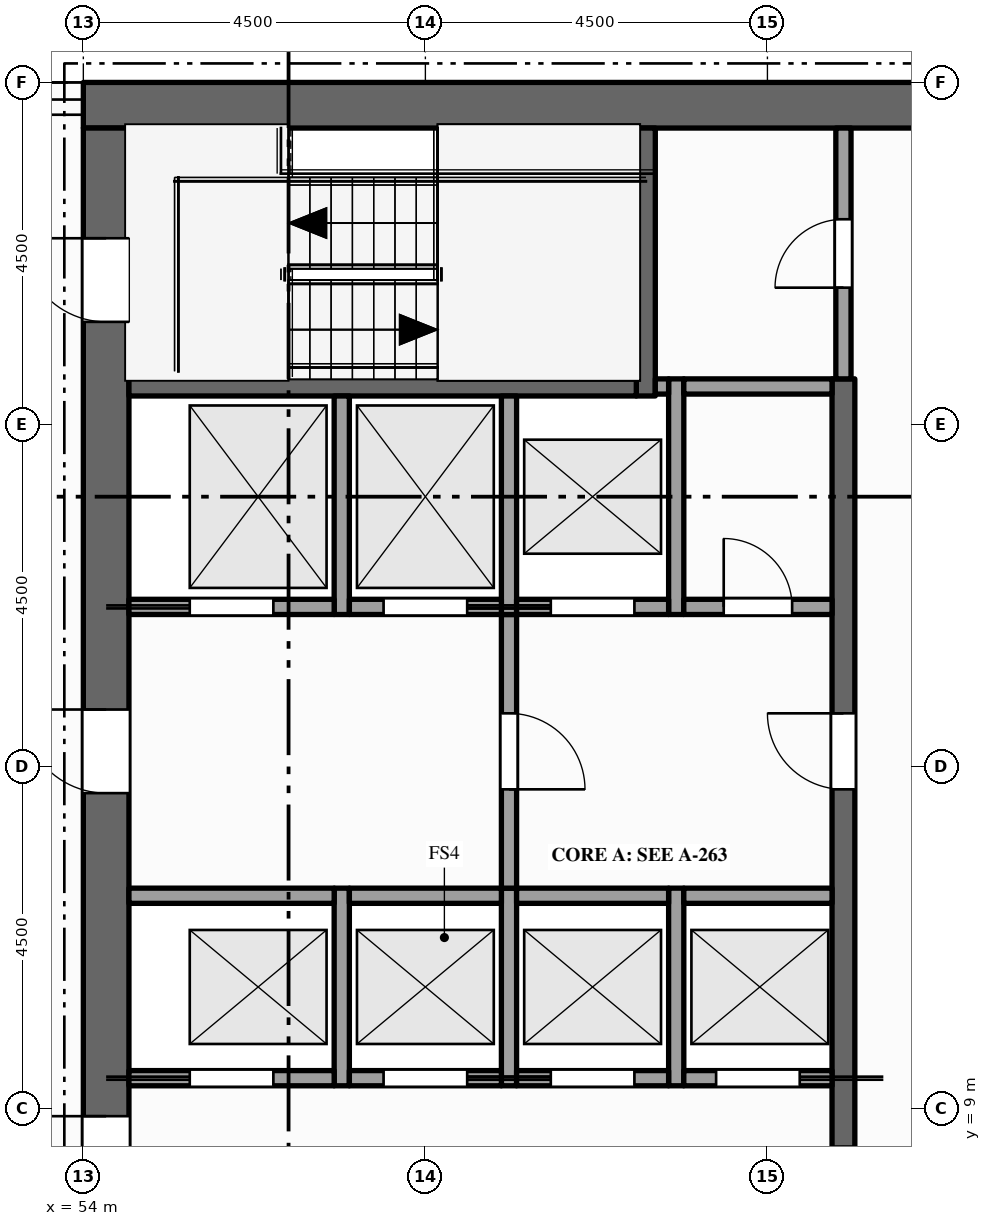
"""IFC4 building model, lengths in metres.
Left out: names, types, materials, properties, quantities, classifications, styles, units other than length and angle.
Written with IfcOpenShell. Run it as: python <this file> out.ifc"""

import sys

from ifc_helpers import new_model, si_unit, direction, frame, frame_2d, origin, place, context, subcontext, project, spatial, rectangle, extrude, element, fill, save


model = new_model("IFC4")
c1 = context("Model", 3, precision=1e-05, world=origin(), true_north=direction((0.0, 1.0)))
c2 = subcontext(c1, "Body", "Model", "MODEL_VIEW")
j1 = project(units=[si_unit("LENGTHUNIT", "METRE"), si_unit("PLANEANGLEUNIT", "RADIAN")], contexts=[c1])
p1 = place(None, origin())
s1 = spatial("IfcSite", under=j1, at=p1, CompositionType="ELEMENT")
p2 = place(p1, origin())
s2 = spatial("IfcBuilding", under=s1, at=p2, CompositionType="ELEMENT")
p3 = place(p2, frame((0.0, 0.0, 345.5)))
s3 = spatial("IfcBuildingStorey", under=s2, at=p3, CompositionType="ELEMENT", Elevation=345.5)
p4 = place(p3, frame((54.0, 22.2, -0.15), z_axis=(0.0, 0.0, 1.0), x_axis=(1.0, 0.0, 0.0)))
e1 = element("IfcWall", 1, at=p4, inside=s3, PredefinedType="SHEAR", context=c2, shape_type="SweptSolid", body=[
    extrude(rectangle(XDim=13.5, YDim=0.6, at=frame_2d((6.75, 0.0))), origin(), (0.0, 0.0, 1.0), 5.0),
])
p5 = place(p3, frame((54.3, 0.6, -0.15), z_axis=(0.0, 0.0, 1.0), x_axis=(0.0, 1.0, 0.0)))
e2 = element("IfcWall", 2, at=p5, inside=s3, PredefinedType="SHEAR", context=c2, shape_type="SweptSolid", body=[
    extrude(rectangle(XDim=21.3, YDim=0.6, at=frame_2d((10.65, 0.0))), origin(), (0.0, 0.0, 1.0), 5.0),
])
p6 = place(p5, frame((6.5, 0.0, 0.15)))
e3 = element("IfcOpeningElement", 3, at=p6, cuts=e2, PredefinedType="OPENING", context=c2, shape_type="SweptSolid", body=[
    extrude(rectangle(XDim=1.8, YDim=2.1, at=frame_2d((0.9, 1.05))), frame((0.0, 0.31, 0.0), z_axis=(0.0, -1.0, 0.0), x_axis=(1.0, 0.0, 0.0)), (0.0, 0.0, 1.0), 0.62),
])
p7 = place(p5, frame((12.55, 0.0, 0.15)))
e4 = element("IfcOpeningElement", 4, at=p7, cuts=e2, PredefinedType="OPENING", context=c2, shape_type="SweptSolid", body=[
    extrude(rectangle(XDim=1.1, YDim=2.1, at=frame_2d((0.55, 1.05))), frame((0.0, 0.31, 0.0), z_axis=(0.0, -1.0, 0.0), x_axis=(1.0, 0.0, 0.0)), (0.0, 0.0, 1.0), 0.62),
])
p8 = place(p5, frame((1.55, 0.0, 0.15)))
e5 = element("IfcOpeningElement", 5, at=p8, cuts=e2, PredefinedType="OPENING", context=c2, shape_type="SweptSolid", body=[
    extrude(rectangle(XDim=1.1, YDim=2.1, at=frame_2d((0.55, 1.05))), frame((0.0, 0.31, 0.0), z_axis=(0.0, -1.0, 0.0), x_axis=(1.0, 0.0, 0.0)), (0.0, 0.0, 1.0), 0.62),
])
p9 = place(p5, frame((18.75, 0.0, 0.15)))
e6 = element("IfcOpeningElement", 6, at=p9, cuts=e2, PredefinedType="OPENING", context=c2, shape_type="SweptSolid", body=[
    extrude(rectangle(XDim=1.1, YDim=2.1, at=frame_2d((0.55, 1.05))), frame((0.0, 0.31, 0.0), z_axis=(0.0, -1.0, 0.0), x_axis=(1.0, 0.0, 0.0)), (0.0, 0.0, 1.0), 0.62),
])
p10 = place(p3, frame((57.4, 9.3, 0.0), z_axis=(0.0, 0.0, 1.0), x_axis=(0.0, 1.0, 0.0)))
e7 = element("IfcWall", 7, at=p10, inside=s3, PredefinedType="SOLIDWALL", context=c2, shape_type="SweptSolid", body=[
    extrude(rectangle(XDim=2.6, YDim=0.2, at=frame_2d((1.3, 0.0))), origin(), (0.0, 0.0, 1.0), 4.8),
])
p11 = place(p3, frame((57.4, 15.5, 0.0), z_axis=(0.0, 0.0, 1.0), x_axis=(0.0, 1.0, 0.0)))
e8 = element("IfcWall", 8, at=p11, inside=s3, PredefinedType="SOLIDWALL", context=c2, shape_type="SweptSolid", body=[
    extrude(rectangle(XDim=2.875, YDim=0.2, at=frame_2d((1.438, 0.0))), origin(), (0.0, 0.0, 1.0), 4.8),
])
p12 = place(p3, frame((59.6, 9.3, 0.0), z_axis=(0.0, 0.0, 1.0), x_axis=(0.0, 1.0, 0.0)))
e9 = element("IfcWall", 9, at=p12, inside=s3, PredefinedType="SOLIDWALL", context=c2, shape_type="SweptSolid", body=[
    extrude(rectangle(XDim=2.6, YDim=0.2, at=frame_2d((1.3, 0.0))), origin(), (0.0, 0.0, 1.0), 4.8),
])
p13 = place(p3, frame((59.6, 11.9, 0.0), z_axis=(0.0, 0.0, 1.0), x_axis=(0.0, 1.0, 0.0)))
e10 = element("IfcWall", 10, at=p13, inside=s3, PredefinedType="PARTITIONING", context=c2, shape_type="SweptSolid", body=[
    extrude(rectangle(XDim=3.6, YDim=0.2, at=frame_2d((1.8, 0.0))), origin(), (0.0, 0.0, 1.0), 4.8),
])
p14 = place(p13, frame((1.3, 0.0, 0.0)))
e11 = element("IfcOpeningElement", 11, at=p14, cuts=e10, PredefinedType="OPENING", context=c2, shape_type="SweptSolid", body=[
    extrude(rectangle(XDim=1.0, YDim=2.1, at=frame_2d((0.5, 1.05))), frame((0.0, 0.11, 0.0), z_axis=(0.0, -1.0, 0.0), x_axis=(1.0, 0.0, 0.0)), (0.0, 0.0, 1.0), 0.22),
])
p15 = place(p3, frame((59.6, 15.5, 0.0), z_axis=(0.0, 0.0, 1.0), x_axis=(0.0, 1.0, 0.0)))
e12 = element("IfcWall", 12, at=p15, inside=s3, PredefinedType="SOLIDWALL", context=c2, shape_type="SweptSolid", body=[
    extrude(rectangle(XDim=2.875, YDim=0.2, at=frame_2d((1.438, 0.0))), origin(), (0.0, 0.0, 1.0), 4.8),
])
p16 = place(p3, frame((61.4, 18.375, 0.0), z_axis=(0.0, 0.0, 1.0), x_axis=(0.0, 1.0, 0.0)))
e13 = element("IfcWall", 13, at=p16, inside=s3, PredefinedType="SHEAR", context=c2, shape_type="SweptSolid", body=[
    extrude(rectangle(XDim=3.525, YDim=0.25, at=frame_2d((1.762, 0.0))), origin(), (0.0, 0.0, 1.0), 4.8),
])
p17 = place(p3, frame((61.8, 9.3, 0.0), z_axis=(0.0, 0.0, 1.0), x_axis=(0.0, 1.0, 0.0)))
e14 = element("IfcWall", 14, at=p17, inside=s3, PredefinedType="SOLIDWALL", context=c2, shape_type="SweptSolid", body=[
    extrude(rectangle(XDim=2.6, YDim=0.2, at=frame_2d((1.3, 0.0))), origin(), (0.0, 0.0, 1.0), 4.8),
])
p18 = place(p3, frame((61.8, 15.5, 0.0), z_axis=(0.0, 0.0, 1.0), x_axis=(0.0, 1.0, 0.0)))
e15 = element("IfcWall", 15, at=p18, inside=s3, PredefinedType="SOLIDWALL", context=c2, shape_type="SweptSolid", body=[
    extrude(rectangle(XDim=3.1, YDim=0.2, at=frame_2d((1.55, 0.0))), origin(), (0.0, 0.0, 1.0), 4.8),
])
p19 = place(p3, frame((64.0, 4.1, 0.0), z_axis=(0.0, 0.0, 1.0), x_axis=(0.0, 1.0, 0.0)))
e16 = element("IfcWall", 16, at=p19, inside=s3, PredefinedType="SHEAR", context=c2, shape_type="SweptSolid", body=[
    extrude(rectangle(XDim=14.5, YDim=0.3, at=frame_2d((7.25, 0.0))), origin(), (0.0, 0.0, 1.0), 4.8),
])
p20 = place(p19, frame((3.4, 0.0, 0.0)))
e17 = element("IfcOpeningElement", 17, at=p20, cuts=e16, PredefinedType="OPENING", context=c2, shape_type="SweptSolid", body=[
    extrude(rectangle(XDim=1.0, YDim=2.1, at=frame_2d((0.5, 1.05))), frame((0.0, 0.16, 0.0), z_axis=(0.0, -1.0, 0.0), x_axis=(1.0, 0.0, 0.0)), (0.0, 0.0, 1.0), 0.32),
])
p21 = place(p19, frame((9.1, 0.0, 0.0)))
e18 = element("IfcOpeningElement", 18, at=p21, cuts=e16, PredefinedType="OPENING", context=c2, shape_type="SweptSolid", body=[
    extrude(rectangle(XDim=1.0, YDim=2.1, at=frame_2d((0.5, 1.05))), frame((0.0, 0.16, 0.0), z_axis=(0.0, -1.0, 0.0), x_axis=(1.0, 0.0, 0.0)), (0.0, 0.0, 1.0), 0.32),
])
p22 = place(p3, frame((64.0, 18.6, 0.0), z_axis=(0.0, 0.0, 1.0), x_axis=(0.0, 1.0, 0.0)))
e19 = element("IfcWall", 19, at=p22, inside=s3, PredefinedType="PARTITIONING", context=c2, shape_type="SweptSolid", body=[
    extrude(rectangle(XDim=3.3, YDim=0.2, at=frame_2d((1.65, 0.0))), origin(), (0.0, 0.0, 1.0), 4.8),
])
p23 = place(p22, frame((1.2, 0.0, 0.0)))
e20 = element("IfcOpeningElement", 20, at=p23, cuts=e19, PredefinedType="OPENING", context=c2, shape_type="SweptSolid", body=[
    extrude(rectangle(XDim=0.9, YDim=2.1, at=frame_2d((0.45, 1.05))), frame((0.0, 0.11, 0.0), z_axis=(0.0, -1.0, 0.0), x_axis=(1.0, 0.0, 0.0)), (0.0, 0.0, 1.0), 0.22),
])
p24 = place(p3, frame((54.6, 9.4, 0.0), z_axis=(0.0, 0.0, 1.0), x_axis=(1.0, 0.0, 0.0)))
e21 = element("IfcWall", 21, at=p24, inside=s3, PredefinedType="SOLIDWALL", context=c2, shape_type="SweptSolid", body=[
    extrude(rectangle(XDim=2.7, YDim=0.2, at=frame_2d((1.35, 0.0))), origin(), (0.0, 0.0, 1.0), 4.8),
])
p25 = place(p24, frame((0.8, 0.0, 0.012)))
e22 = element("IfcOpeningElement", 22, at=p25, cuts=e21, PredefinedType="OPENING", context=c2, shape_type="SweptSolid", body=[
    extrude(rectangle(XDim=1.1, YDim=2.1, at=frame_2d((0.55, 1.05))), frame((0.0, 0.11, 0.0), z_axis=(0.0, -1.0, 0.0), x_axis=(1.0, 0.0, 0.0)), (0.0, 0.0, 1.0), 0.22),
])
p26 = place(p3, frame((57.5, 9.4, 0.0), z_axis=(0.0, 0.0, 1.0), x_axis=(1.0, 0.0, 0.0)))
e23 = element("IfcWall", 23, at=p26, inside=s3, PredefinedType="SOLIDWALL", context=c2, shape_type="SweptSolid", body=[
    extrude(rectangle(XDim=2.0, YDim=0.2, at=frame_2d((1.0, 0.0))), origin(), (0.0, 0.0, 1.0), 4.8),
])
p27 = place(p26, frame((0.45, 0.0, 0.012)))
e24 = element("IfcOpeningElement", 24, at=p27, cuts=e23, PredefinedType="OPENING", context=c2, shape_type="SweptSolid", body=[
    extrude(rectangle(XDim=1.1, YDim=2.1, at=frame_2d((0.55, 1.05))), frame((0.0, 0.11, 0.0), z_axis=(0.0, -1.0, 0.0), x_axis=(1.0, 0.0, 0.0)), (0.0, 0.0, 1.0), 0.22),
])
p28 = place(p3, frame((59.7, 9.4, 0.0), z_axis=(0.0, 0.0, 1.0), x_axis=(1.0, 0.0, 0.0)))
e25 = element("IfcWall", 25, at=p28, inside=s3, PredefinedType="SOLIDWALL", context=c2, shape_type="SweptSolid", body=[
    extrude(rectangle(XDim=2.0, YDim=0.2, at=frame_2d((1.0, 0.0))), origin(), (0.0, 0.0, 1.0), 4.8),
])
p29 = place(p28, frame((0.45, 0.0, 0.012)))
e26 = element("IfcOpeningElement", 26, at=p29, cuts=e25, PredefinedType="OPENING", context=c2, shape_type="SweptSolid", body=[
    extrude(rectangle(XDim=1.1, YDim=2.1, at=frame_2d((0.55, 1.05))), frame((0.0, 0.11, 0.0), z_axis=(0.0, -1.0, 0.0), x_axis=(1.0, 0.0, 0.0)), (0.0, 0.0, 1.0), 0.22),
])
p30 = place(p3, frame((61.9, 9.4, 0.0), z_axis=(0.0, 0.0, 1.0), x_axis=(1.0, 0.0, 0.0)))
e27 = element("IfcWall", 27, at=p30, inside=s3, PredefinedType="SOLIDWALL", context=c2, shape_type="SweptSolid", body=[
    extrude(rectangle(XDim=1.95, YDim=0.2, at=frame_2d((0.975, 0.0))), origin(), (0.0, 0.0, 1.0), 4.8),
])
p31 = place(p30, frame((0.425, 0.0, 0.012)))
e28 = element("IfcOpeningElement", 28, at=p31, cuts=e27, PredefinedType="OPENING", context=c2, shape_type="SweptSolid", body=[
    extrude(rectangle(XDim=1.1, YDim=2.1, at=frame_2d((0.55, 1.05))), frame((0.0, 0.11, 0.0), z_axis=(0.0, -1.0, 0.0), x_axis=(1.0, 0.0, 0.0)), (0.0, 0.0, 1.0), 0.22),
])
p32 = place(p3, frame((54.6, 11.8, 0.0), z_axis=(0.0, 0.0, 1.0), x_axis=(1.0, 0.0, 0.0)))
e29 = element("IfcWall", 29, at=p32, inside=s3, PredefinedType="SOLIDWALL", context=c2, shape_type="SweptSolid", body=[
    extrude(rectangle(XDim=2.7, YDim=0.2, at=frame_2d((1.35, 0.0))), origin(), (0.0, 0.0, 1.0), 4.8),
])
for number, where, z_axis, x_axis in (
    (30, (57.5, 11.8, 0.0), (0.0, 0.0, 1.0), (1.0, 0.0, 0.0)),
    (31, (59.7, 11.8, 0.0), (0.0, 0.0, 1.0), (1.0, 0.0, 0.0)),
):
    element("IfcWall", number, at=place(p3, frame(where, z_axis=z_axis, x_axis=x_axis)), inside=s3, PredefinedType="SOLIDWALL", context=c2, shape_type="SweptSolid", body=[
        extrude(rectangle(XDim=2.0, YDim=0.2, at=frame_2d((1.0, 0.0))), origin(), (0.0, 0.0, 1.0), 4.8),
    ])
p33 = place(p3, frame((61.9, 11.8, 0.0), z_axis=(0.0, 0.0, 1.0), x_axis=(1.0, 0.0, 0.0)))
e32 = element("IfcWall", 32, at=p33, inside=s3, PredefinedType="SOLIDWALL", context=c2, shape_type="SweptSolid", body=[
    extrude(rectangle(XDim=1.95, YDim=0.2, at=frame_2d((0.975, 0.0))), origin(), (0.0, 0.0, 1.0), 4.8),
])
p34 = place(p3, frame((54.6, 15.6, 0.0), z_axis=(0.0, 0.0, 1.0), x_axis=(1.0, 0.0, 0.0)))
e33 = element("IfcWall", 33, at=p34, inside=s3, PredefinedType="SOLIDWALL", context=c2, shape_type="SweptSolid", body=[
    extrude(rectangle(XDim=2.7, YDim=0.2, at=frame_2d((1.35, 0.0))), origin(), (0.0, 0.0, 1.0), 4.8),
])
p35 = place(p34, frame((0.8, 0.0, 0.012)))
e34 = element("IfcOpeningElement", 34, at=p35, cuts=e33, PredefinedType="OPENING", context=c2, shape_type="SweptSolid", body=[
    extrude(rectangle(XDim=1.1, YDim=2.1, at=frame_2d((0.55, 1.05))), frame((0.0, 0.11, 0.0), z_axis=(0.0, -1.0, 0.0), x_axis=(1.0, 0.0, 0.0)), (0.0, 0.0, 1.0), 0.22),
])
p36 = place(p3, frame((57.5, 15.6, 0.0), z_axis=(0.0, 0.0, 1.0), x_axis=(1.0, 0.0, 0.0)))
e35 = element("IfcWall", 35, at=p36, inside=s3, PredefinedType="SOLIDWALL", context=c2, shape_type="SweptSolid", body=[
    extrude(rectangle(XDim=2.0, YDim=0.2, at=frame_2d((1.0, 0.0))), origin(), (0.0, 0.0, 1.0), 4.8),
])
p37 = place(p36, frame((0.45, 0.0, 0.012)))
e36 = element("IfcOpeningElement", 36, at=p37, cuts=e35, PredefinedType="OPENING", context=c2, shape_type="SweptSolid", body=[
    extrude(rectangle(XDim=1.1, YDim=2.1, at=frame_2d((0.55, 1.05))), frame((0.0, 0.11, 0.0), z_axis=(0.0, -1.0, 0.0), x_axis=(1.0, 0.0, 0.0)), (0.0, 0.0, 1.0), 0.22),
])
p38 = place(p3, frame((59.7, 15.6, 0.0), z_axis=(0.0, 0.0, 1.0), x_axis=(1.0, 0.0, 0.0)))
e37 = element("IfcWall", 37, at=p38, inside=s3, PredefinedType="SOLIDWALL", context=c2, shape_type="SweptSolid", body=[
    extrude(rectangle(XDim=2.0, YDim=0.2, at=frame_2d((1.0, 0.0))), origin(), (0.0, 0.0, 1.0), 4.8),
])
p39 = place(p38, frame((0.45, 0.0, 0.012)))
e38 = element("IfcOpeningElement", 38, at=p39, cuts=e37, PredefinedType="OPENING", context=c2, shape_type="SweptSolid", body=[
    extrude(rectangle(XDim=1.1, YDim=2.1, at=frame_2d((0.55, 1.05))), frame((0.0, 0.11, 0.0), z_axis=(0.0, -1.0, 0.0), x_axis=(1.0, 0.0, 0.0)), (0.0, 0.0, 1.0), 0.22),
])
p40 = place(p3, frame((61.9, 15.6, 0.0), z_axis=(0.0, 0.0, 1.0), x_axis=(1.0, 0.0, 0.0)))
e39 = element("IfcWall", 39, at=p40, inside=s3, PredefinedType="PARTITIONING", context=c2, shape_type="SweptSolid", body=[
    extrude(rectangle(XDim=1.95, YDim=0.2, at=frame_2d((0.975, 0.0))), origin(), (0.0, 0.0, 1.0), 4.8),
])
p41 = place(p40, frame((0.525, 0.0, 0.0)))
e40 = element("IfcOpeningElement", 40, at=p41, cuts=e39, PredefinedType="OPENING", context=c2, shape_type="SweptSolid", body=[
    extrude(rectangle(XDim=0.9, YDim=2.1, at=frame_2d((0.45, 1.05))), frame((0.0, 0.11, 0.0), z_axis=(0.0, -1.0, 0.0), x_axis=(1.0, 0.0, 0.0)), (0.0, 0.0, 1.0), 0.22),
])
p42 = place(p3, frame((54.6, 18.5, 0.0), z_axis=(0.0, 0.0, 1.0), x_axis=(1.0, 0.0, 0.0)))
e41 = element("IfcWall", 41, at=p42, inside=s3, PredefinedType="SHEAR", context=c2, shape_type="SweptSolid", body=[
    extrude(rectangle(XDim=6.675, YDim=0.25, at=frame_2d((3.337, 0.0))), origin(), (0.0, 0.0, 1.0), 4.8),
])
p43 = place(p3, frame((61.525, 18.5, 0.0), z_axis=(0.0, 0.0, 1.0), x_axis=(1.0, 0.0, 0.0)))
e42 = element("IfcWall", 42, at=p43, inside=s3, PredefinedType="SOLIDWALL", context=c2, shape_type="SweptSolid", body=[
    extrude(rectangle(XDim=0.175, YDim=0.2, at=frame_2d((0.087, 0.0))), origin(), (0.0, 0.0, 1.0), 4.8),
])
p44 = place(p3, frame((61.9, 18.5, 0.0), z_axis=(0.0, 0.0, 1.0), x_axis=(1.0, 0.0, 0.0)))
e43 = element("IfcWall", 43, at=p44, inside=s3, PredefinedType="PARTITIONING", context=c2, shape_type="SweptSolid", body=[
    extrude(rectangle(XDim=1.95, YDim=0.2, at=frame_2d((0.975, 0.0))), origin(), (0.0, 0.0, 1.0), 4.8),
])
p45 = place(p25, origin())
e44 = element("IfcDoor", 44, at=p45, inside=s3, OperationType="SLIDING_TO_LEFT", PredefinedType="DOOR", context=c2, shape_type="SweptSolid", body=[
    extrude(rectangle(XDim=1.1, YDim=2.1, at=frame_2d((0.55, 1.05))), frame((0.0, 0.025, 0.0), z_axis=(0.0, -1.0, 0.0), x_axis=(1.0, 0.0, 0.0)), (0.0, 0.0, 1.0), 0.05),
])
fill(e22, e44)
p46 = place(p27, origin())
e45 = element("IfcDoor", 45, at=p46, inside=s3, OperationType="SLIDING_TO_RIGHT", PredefinedType="DOOR", context=c2, shape_type="SweptSolid", body=[
    extrude(rectangle(XDim=1.1, YDim=2.1, at=frame_2d((0.55, 1.05))), frame((0.0, 0.025, 0.0), z_axis=(0.0, -1.0, 0.0), x_axis=(1.0, 0.0, 0.0)), (0.0, 0.0, 1.0), 0.05),
])
fill(e24, e45)
p47 = place(p29, origin())
e46 = element("IfcDoor", 46, at=p47, inside=s3, OperationType="SLIDING_TO_LEFT", PredefinedType="DOOR", context=c2, shape_type="SweptSolid", body=[
    extrude(rectangle(XDim=1.1, YDim=2.1, at=frame_2d((0.55, 1.05))), frame((0.0, 0.025, 0.0), z_axis=(0.0, -1.0, 0.0), x_axis=(1.0, 0.0, 0.0)), (0.0, 0.0, 1.0), 0.05),
])
fill(e26, e46)
p48 = place(p31, origin())
e47 = element("IfcDoor", 47, at=p48, inside=s3, OperationType="SLIDING_TO_RIGHT", PredefinedType="DOOR", context=c2, shape_type="SweptSolid", body=[
    extrude(rectangle(XDim=1.1, YDim=2.1, at=frame_2d((0.55, 1.05))), frame((0.0, 0.025, 0.0), z_axis=(0.0, -1.0, 0.0), x_axis=(1.0, 0.0, 0.0)), (0.0, 0.0, 1.0), 0.05),
])
fill(e28, e47)
p49 = place(p35, origin())
e48 = element("IfcDoor", 48, at=p49, inside=s3, OperationType="SLIDING_TO_LEFT", PredefinedType="DOOR", context=c2, shape_type="SweptSolid", body=[
    extrude(rectangle(XDim=1.1, YDim=2.1, at=frame_2d((0.55, 1.05))), frame((0.0, 0.025, 0.0), z_axis=(0.0, -1.0, 0.0), x_axis=(1.0, 0.0, 0.0)), (0.0, 0.0, 1.0), 0.05),
])
fill(e34, e48)
p50 = place(p37, origin())
e49 = element("IfcDoor", 49, at=p50, inside=s3, OperationType="SLIDING_TO_RIGHT", PredefinedType="DOOR", context=c2, shape_type="SweptSolid", body=[
    extrude(rectangle(XDim=1.1, YDim=2.1, at=frame_2d((0.55, 1.05))), frame((0.0, 0.025, 0.0), z_axis=(0.0, -1.0, 0.0), x_axis=(1.0, 0.0, 0.0)), (0.0, 0.0, 1.0), 0.05),
])
fill(e36, e49)
p51 = place(p39, origin())
e50 = element("IfcDoor", 50, at=p51, inside=s3, OperationType="SLIDING_TO_LEFT", PredefinedType="DOOR", context=c2, shape_type="SweptSolid", body=[
    extrude(rectangle(XDim=1.1, YDim=2.1, at=frame_2d((0.55, 1.05))), frame((0.0, 0.025, 0.0), z_axis=(0.0, -1.0, 0.0), x_axis=(1.0, 0.0, 0.0)), (0.0, 0.0, 1.0), 0.05),
])
fill(e38, e50)
p52 = place(p6, origin())
e51 = element("IfcDoor", 51, at=p52, inside=s3, OperationType="DOUBLE_DOOR_SINGLE_SWING", PredefinedType="DOOR", context=c2, shape_type="SweptSolid", body=[
    extrude(rectangle(XDim=1.8, YDim=2.1, at=frame_2d((0.9, 1.05))), frame((0.0, 0.025, 0.0), z_axis=(0.0, -1.0, 0.0), x_axis=(1.0, 0.0, 0.0)), (0.0, 0.0, 1.0), 0.05),
])
fill(e3, e51)
p53 = place(p7, origin())
e52 = element("IfcDoor", 52, at=p53, inside=s3, OperationType="SINGLE_SWING_RIGHT", PredefinedType="DOOR", context=c2, shape_type="SweptSolid", body=[
    extrude(rectangle(XDim=1.1, YDim=2.1, at=frame_2d((0.55, 1.05))), frame((0.0, 0.025, 0.0), z_axis=(0.0, -1.0, 0.0), x_axis=(1.0, 0.0, 0.0)), (0.0, 0.0, 1.0), 0.05),
])
fill(e4, e52)
p54 = place(p14, origin())
e53 = element("IfcDoor", 53, at=p54, inside=s3, OperationType="SINGLE_SWING_LEFT", PredefinedType="DOOR", context=c2, shape_type="SweptSolid", body=[
    extrude(rectangle(XDim=1.0, YDim=2.1, at=frame_2d((0.5, 1.05))), frame((0.0, 0.025, 0.0), z_axis=(0.0, -1.0, 0.0), x_axis=(1.0, 0.0, 0.0)), (0.0, 0.0, 1.0), 0.05),
])
fill(e11, e53)
p55 = place(p21, origin())
e54 = element("IfcDoor", 54, at=p55, inside=s3, OperationType="SINGLE_SWING_RIGHT", PredefinedType="DOOR", context=c2, shape_type="SweptSolid", body=[
    extrude(rectangle(XDim=1.0, YDim=2.1, at=frame_2d((0.5, 1.05))), frame((0.0, 0.025, 0.0), z_axis=(0.0, -1.0, 0.0), x_axis=(1.0, 0.0, 0.0)), (0.0, 0.0, 1.0), 0.05),
])
fill(e18, e54)
p56 = place(p9, origin())
e55 = element("IfcDoor", 55, at=p56, inside=s3, OperationType="SINGLE_SWING_RIGHT", PredefinedType="DOOR", context=c2, shape_type="SweptSolid", body=[
    extrude(rectangle(XDim=1.1, YDim=2.1, at=frame_2d((0.55, 1.05))), frame((0.0, 0.025, 0.0), z_axis=(0.0, -1.0, 0.0), x_axis=(1.0, 0.0, 0.0)), (0.0, 0.0, 1.0), 0.05),
])
fill(e6, e55)
p57 = place(p23, origin())
e56 = element("IfcDoor", 56, at=p57, inside=s3, OperationType="SINGLE_SWING_LEFT", PredefinedType="DOOR", context=c2, shape_type="SweptSolid", body=[
    extrude(rectangle(XDim=0.9, YDim=2.1, at=frame_2d((0.45, 1.05))), frame((0.0, 0.025, 0.0), z_axis=(0.0, -1.0, 0.0), x_axis=(1.0, 0.0, 0.0)), (0.0, 0.0, 1.0), 0.05),
])
fill(e20, e56)
p58 = place(p41, origin())
e57 = element("IfcDoor", 57, at=p58, inside=s3, OperationType="SINGLE_SWING_LEFT", PredefinedType="DOOR", context=c2, shape_type="SweptSolid", body=[
    extrude(rectangle(XDim=0.9, YDim=2.1, at=frame_2d((0.45, 1.05))), frame((0.0, 0.025, 0.0), z_axis=(0.0, -1.0, 0.0), x_axis=(1.0, 0.0, 0.0)), (0.0, 0.0, 1.0), 0.05),
])
fill(e40, e57)
save(model, sys.argv[1])
